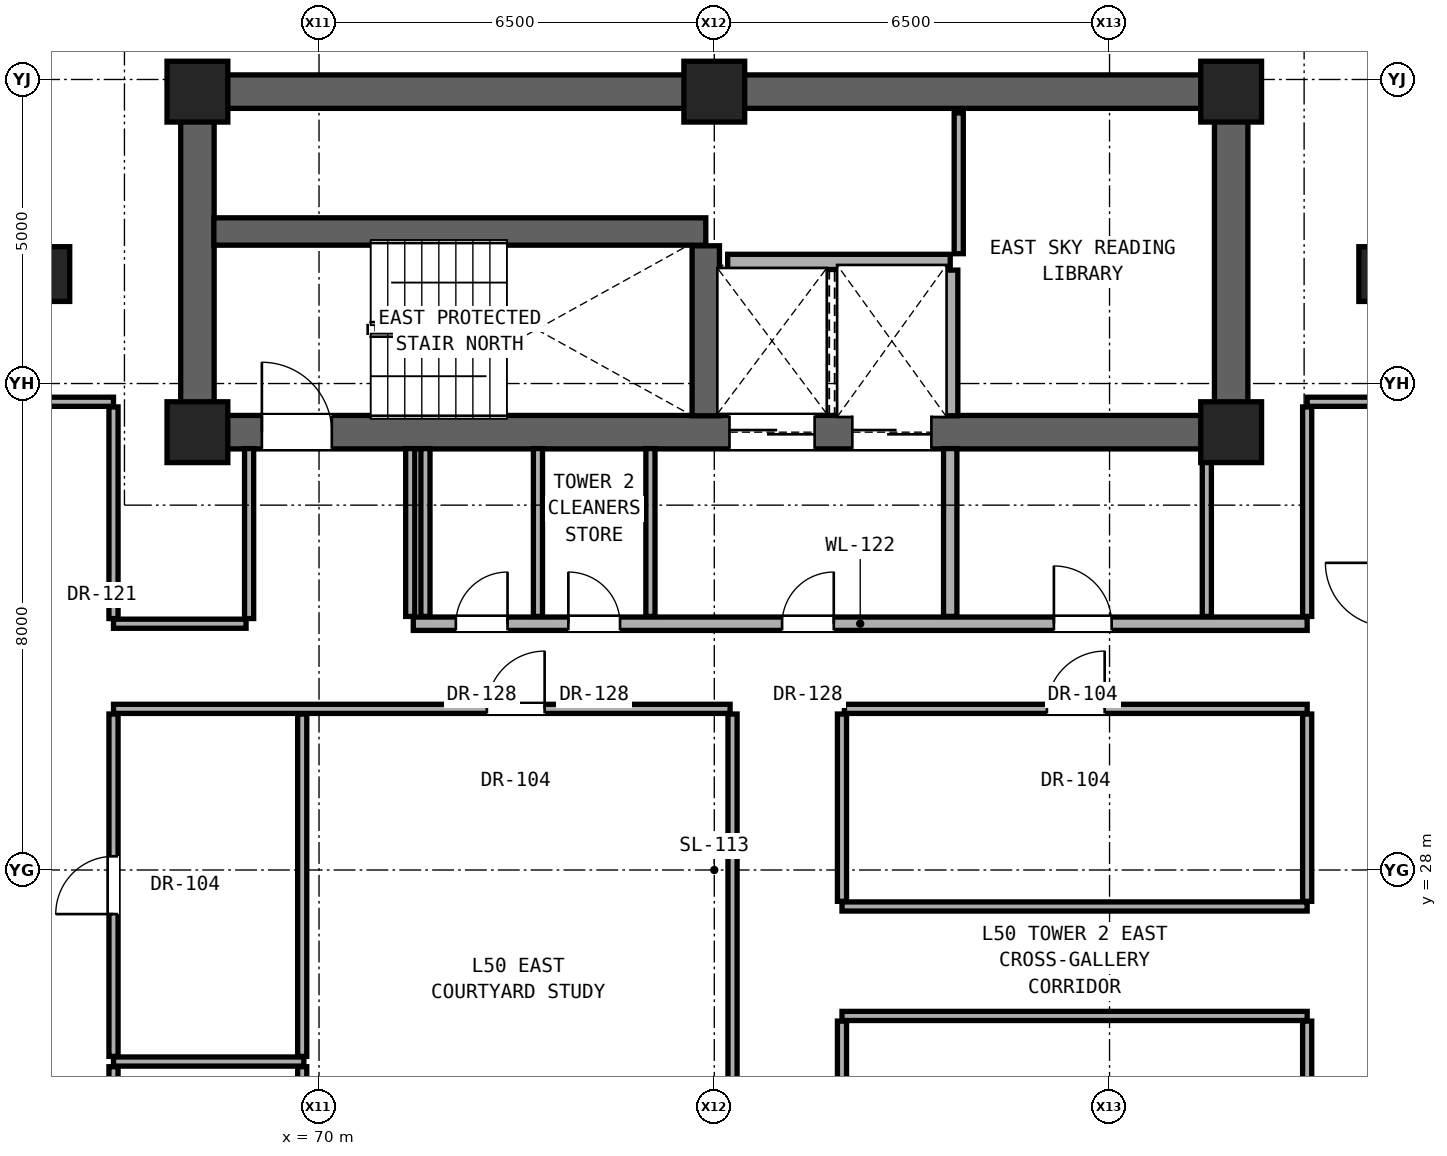
"""IFC4 building model, lengths in metres.
Left out: names, types, materials, properties, quantities, classifications, styles, units other than length and angle.
Written with IfcOpenShell. Run it as: python <this file> out.ifc"""

import sys

from ifc_helpers import new_model, si_unit, direction, frame, frame_2d, origin, origin_2d, place, context, subcontext, project, spatial, rectangle, extrude, element, fill, save


model = new_model("IFC4")
c1 = context("Model", 3, precision=1e-05, world=origin(), true_north=direction((0.0, 1.0)))
c2 = subcontext(c1, "Body", "Model", "MODEL_VIEW")
j1 = project(units=[si_unit("LENGTHUNIT", "METRE"), si_unit("PLANEANGLEUNIT", "RADIAN")], contexts=[c1])
p1 = place(None, origin())
s1 = spatial("IfcSite", under=j1, at=p1, CompositionType="ELEMENT")
p2 = place(p1, origin())
s2 = spatial("IfcBuilding", under=s1, at=p2, CompositionType="ELEMENT")
p3 = place(p2, frame((0.0, 0.0, 177.15)))
s3 = spatial("IfcBuildingStorey", under=s2, at=p3, CompositionType="ELEMENT", Elevation=177.15)
for number, where, z_axis, x_axis in (
    (1, (68.0, 35.2, 0.0), (0.0, 0.0, 1.0), (1.0, 0.0, 0.0)),
    (2, (85.0, 35.2, 0.0), (0.0, 0.0, 1.0), (1.0, 0.0, 0.0)),
    (3, (68.0, 40.8, 0.0), (0.0, 0.0, 1.0), (1.0, 0.0, 0.0)),
    (4, (76.5, 40.8, 0.0), (0.0, 0.0, 1.0), (1.0, 0.0, 0.0)),
    (5, (85.0, 40.8, 0.0), (0.0, 0.0, 1.0), (1.0, 0.0, 0.0)),
):
    element("IfcColumn", number, at=place(p3, frame(where, z_axis=z_axis, x_axis=x_axis)), inside=s3, PredefinedType="COLUMN", context=c2, shape_type="SweptSolid", body=[
        extrude(rectangle(XDim=1.0, YDim=1.0, at=origin_2d()), origin(), (0.0, 0.0, 1.0), 3.25),
    ])
for number, where, z_axis, x_axis in (
    (6, (65.6, 37.8, 0.0), (0.0, 0.0, 1.0), (1.0, 0.0, 0.0)),
    (7, (87.4, 37.8, 0.0), (0.0, 0.0, 1.0), (1.0, 0.0, 0.0)),
):
    element("IfcColumn", number, at=place(p3, frame(where, z_axis=z_axis, x_axis=x_axis)), inside=s3, PredefinedType="PILASTER", context=c2, shape_type="SweptSolid", body=[
        extrude(rectangle(XDim=0.6, YDim=0.9, at=origin_2d()), origin(), (0.0, 0.0, 1.0), 3.25),
    ])
p4 = place(p3, frame((68.0, 40.8, 0.0), z_axis=(0.0, 0.0, 1.0), x_axis=(1.0, 0.0, 0.0)))
e8 = element("IfcWall", 8, at=p4, inside=s3, PredefinedType="SHEAR", context=c2, shape_type="SweptSolid", body=[
    extrude(rectangle(XDim=17.0, YDim=0.55, at=frame_2d((8.5, 0.0))), origin(), (0.0, 0.0, 1.0), 3.05),
])
for number, where, z_axis, x_axis in (
    (9, (68.0, 35.2, 0.0), (0.0, 0.0, 1.0), (0.0, 1.0, 0.0)),
    (10, (85.0, 35.2, 0.0), (0.0, 0.0, 1.0), (0.0, 1.0, 0.0)),
):
    element("IfcWall", number, at=place(p3, frame(where, z_axis=z_axis, x_axis=x_axis)), inside=s3, PredefinedType="SHEAR", context=c2, shape_type="SweptSolid", body=[
        extrude(rectangle(XDim=5.6, YDim=0.55, at=frame_2d((2.8, 0.0))), origin(), (0.0, 0.0, 1.0), 3.05),
    ])
p5 = place(p3, frame((68.0, 35.2, 0.0), z_axis=(0.0, 0.0, 1.0), x_axis=(1.0, 0.0, 0.0)))
e11 = element("IfcWall", 11, at=p5, inside=s3, PredefinedType="SHEAR", context=c2, shape_type="SweptSolid", body=[
    extrude(rectangle(XDim=17.0, YDim=0.55, at=frame_2d((8.5, 0.0))), origin(), (0.0, 0.0, 1.0), 3.05),
])
p6 = place(p5, frame((1.06, 0.0, 0.0)))
e12 = element("IfcOpeningElement", 12, at=p6, cuts=e11, PredefinedType="OPENING", context=c2, shape_type="SweptSolid", body=[
    extrude(rectangle(XDim=1.15, YDim=2.2, at=frame_2d((0.575, 1.1))), frame((0.0, 0.285, 0.0), z_axis=(0.0, -1.0, 0.0), x_axis=(1.0, 0.0, 0.0)), (0.0, 0.0, 1.0), 0.57),
])
p7 = place(p5, frame((8.75, 0.0, 0.0)))
e13 = element("IfcOpeningElement", 13, at=p7, cuts=e11, PredefinedType="OPENING", context=c2, shape_type="SweptSolid", body=[
    extrude(rectangle(XDim=1.4, YDim=2.35, at=frame_2d((0.7, 1.175))), frame((0.0, 0.285, 0.0), z_axis=(0.0, -1.0, 0.0), x_axis=(1.0, 0.0, 0.0)), (0.0, 0.0, 1.0), 0.57),
])
p8 = place(p5, frame((10.77, 0.0, 0.0)))
e14 = element("IfcOpeningElement", 14, at=p8, cuts=e11, PredefinedType="OPENING", context=c2, shape_type="SweptSolid", body=[
    extrude(rectangle(XDim=1.3, YDim=2.3, at=frame_2d((0.65, 1.15))), frame((0.0, 0.285, 0.0), z_axis=(0.0, -1.0, 0.0), x_axis=(1.0, 0.0, 0.0)), (0.0, 0.0, 1.0), 0.57),
])
p9 = place(p3, frame((66.62, 24.85, 0.0), z_axis=(0.0, 0.0, 1.0), x_axis=(1.0, 0.0, 0.0)))
e15 = element("IfcWall", 15, at=p9, inside=s3, PredefinedType="PARTITIONING", context=c2, shape_type="SweptSolid", body=[
    extrude(rectangle(XDim=3.13, YDim=0.15, at=frame_2d((1.565, 0.0))), origin(), (0.0, 0.0, 1.0), 2.186),
])
for number, where, z_axis, x_axis in (
    (16, (78.6, 25.6, 0.0), (0.0, 0.0, 1.0), (1.0, 0.0, 0.0)),
    (17, (78.6, 27.4, 0.0), (0.0, 0.0, 1.0), (1.0, 0.0, 0.0)),
):
    element("IfcWall", number, at=place(p3, frame(where, z_axis=z_axis, x_axis=x_axis)), inside=s3, PredefinedType="PARTITIONING", context=c2, shape_type="SweptSolid", body=[
        extrude(rectangle(XDim=7.65, YDim=0.15, at=frame_2d((3.825, 0.0))), origin(), (0.0, 0.0, 1.0), 2.186),
    ])
p10 = place(p3, frame((66.62, 30.65, 0.0), z_axis=(0.0, 0.0, 1.0), x_axis=(1.0, 0.0, 0.0)))
e18 = element("IfcWall", 18, at=p10, inside=s3, PredefinedType="PARTITIONING", context=c2, shape_type="SweptSolid", body=[
    extrude(rectangle(XDim=10.14, YDim=0.15, at=frame_2d((5.07, 0.0))), origin(), (0.0, 0.0, 1.0), 2.186),
])
p11 = place(p10, frame((6.14, 0.0, 0.0)))
e19 = element("IfcOpeningElement", 19, at=p11, cuts=e18, PredefinedType="OPENING", context=c2, shape_type="SweptSolid", body=[
    extrude(rectangle(XDim=0.95, YDim=2.15, at=frame_2d((0.475, 1.075))), frame((0.0, 0.085, 0.0), z_axis=(0.0, -1.0, 0.0), x_axis=(1.0, 0.0, 0.0)), (0.0, 0.0, 1.0), 0.17),
])
p12 = place(p3, frame((78.64, 30.65, 0.0), z_axis=(0.0, 0.0, 1.0), x_axis=(1.0, 0.0, 0.0)))
e20 = element("IfcWall", 20, at=p12, inside=s3, PredefinedType="PARTITIONING", context=c2, shape_type="SweptSolid", body=[
    extrude(rectangle(XDim=7.61, YDim=0.15, at=frame_2d((3.805, 0.0))), origin(), (0.0, 0.0, 1.0), 2.186),
])
p13 = place(p12, frame((3.33, 0.0, 0.0)))
e21 = element("IfcOpeningElement", 21, at=p13, cuts=e20, PredefinedType="OPENING", context=c2, shape_type="SweptSolid", body=[
    extrude(rectangle(XDim=0.95, YDim=2.15, at=frame_2d((0.475, 1.075))), frame((0.0, 0.085, 0.0), z_axis=(0.0, -1.0, 0.0), x_axis=(1.0, 0.0, 0.0)), (0.0, 0.0, 1.0), 0.17),
])
p14 = place(p3, frame((66.62, 32.05, 0.0), z_axis=(0.0, 0.0, 1.0), x_axis=(1.0, 0.0, 0.0)))
e22 = element("IfcWall", 22, at=p14, inside=s3, PredefinedType="PARTITIONING", context=c2, shape_type="SweptSolid", body=[
    extrude(rectangle(XDim=2.18, YDim=0.15, at=frame_2d((1.09, 0.0))), origin(), (0.0, 0.0, 1.0), 2.186),
])
p15 = place(p3, frame((71.55, 32.05, 0.0), z_axis=(0.0, 0.0, 1.0), x_axis=(1.0, 0.0, 0.0)))
e23 = element("IfcWall", 23, at=p15, inside=s3, PredefinedType="SOLIDWALL", context=c2, shape_type="SweptSolid", body=[
    extrude(rectangle(XDim=14.7, YDim=0.22, at=frame_2d((7.35, 0.0))), origin(), (0.0, 0.0, 1.0), 2.186),
])
p16 = place(p15, frame((6.065, 0.0, 0.0)))
e24 = element("IfcOpeningElement", 24, at=p16, cuts=e23, PredefinedType="OPENING", context=c2, shape_type="SweptSolid", body=[
    extrude(rectangle(XDim=0.85, YDim=2.01, at=frame_2d((0.425, 1.005))), frame((0.0, 0.12, 0.0), z_axis=(0.0, -1.0, 0.0), x_axis=(1.0, 0.0, 0.0)), (0.0, 0.0, 1.0), 0.24),
])
p17 = place(p15, frame((10.535, 0.0, 0.0)))
e25 = element("IfcOpeningElement", 25, at=p17, cuts=e23, PredefinedType="OPENING", context=c2, shape_type="SweptSolid", body=[
    extrude(rectangle(XDim=0.95, YDim=2.15, at=frame_2d((0.475, 1.075))), frame((0.0, 0.12, 0.0), z_axis=(0.0, -1.0, 0.0), x_axis=(1.0, 0.0, 0.0)), (0.0, 0.0, 1.0), 0.24),
])
p18 = place(p15, frame((0.7, 0.0, 0.0)))
e26 = element("IfcOpeningElement", 26, at=p18, cuts=e23, PredefinedType="OPENING", context=c2, shape_type="SweptSolid", body=[
    extrude(rectangle(XDim=0.85, YDim=2.01, at=frame_2d((0.425, 1.005))), frame((0.0, 0.12, 0.0), z_axis=(0.0, -1.0, 0.0), x_axis=(1.0, 0.0, 0.0)), (0.0, 0.0, 1.0), 0.24),
])
p19 = place(p15, frame((2.55, 0.0, 0.0)))
e27 = element("IfcOpeningElement", 27, at=p19, cuts=e23, PredefinedType="OPENING", context=c2, shape_type="SweptSolid", body=[
    extrude(rectangle(XDim=0.85, YDim=2.01, at=frame_2d((0.425, 1.005))), frame((0.0, 0.12, 0.0), z_axis=(0.0, -1.0, 0.0), x_axis=(1.0, 0.0, 0.0)), (0.0, 0.0, 1.0), 0.24),
])
p20 = place(p3, frame((65.25, 35.7, 0.0), z_axis=(0.0, 0.0, 1.0), x_axis=(1.0, 0.0, 0.0)))
e28 = element("IfcWall", 28, at=p20, inside=s3, PredefinedType="PARTITIONING", context=c2, shape_type="SweptSolid", body=[
    extrude(rectangle(XDim=1.37, YDim=0.15, at=frame_2d((0.685, 0.0))), origin(), (0.0, 0.0, 1.0), 3.05),
])
p21 = place(p3, frame((86.25, 35.7, 0.0), z_axis=(0.0, 0.0, 1.0), x_axis=(1.0, 0.0, 0.0)))
e29 = element("IfcWall", 29, at=p21, inside=s3, PredefinedType="PARTITIONING", context=c2, shape_type="SweptSolid", body=[
    extrude(rectangle(XDim=1.35, YDim=0.15, at=frame_2d((0.675, 0.0))), origin(), (0.0, 0.0, 1.0), 3.05),
])
p22 = place(p3, frame((76.72, 38.0, 0.0), z_axis=(0.0, 0.0, 1.0), x_axis=(1.0, 0.0, 0.0)))
e30 = element("IfcWall", 30, at=p22, inside=s3, PredefinedType="SOLIDWALL", context=c2, shape_type="SweptSolid", body=[
    extrude(rectangle(XDim=3.66, YDim=0.25, at=frame_2d((1.83, 0.0))), origin(), (0.0, 0.0, 1.0), 3.05),
])
p23 = place(p3, frame((68.27, 38.5, 0.0), z_axis=(0.0, 0.0, 1.0), x_axis=(1.0, 0.0, 0.0)))
e31 = element("IfcWall", 31, at=p23, inside=s3, PredefinedType="SHEAR", context=c2, shape_type="SweptSolid", body=[
    extrude(rectangle(XDim=8.09, YDim=0.45, at=frame_2d((4.045, 0.0))), origin(), (0.0, 0.0, 1.0), 3.05),
])
p24 = place(p3, frame((66.62, 22.435, 0.0), z_axis=(0.0, 0.0, 1.0), x_axis=(0.0, 1.0, 0.0)))
e32 = element("IfcWall", 32, at=p24, inside=s3, PredefinedType="PARTITIONING", context=c2, shape_type="SweptSolid", body=[
    extrude(rectangle(XDim=2.33, YDim=0.15, at=frame_2d((1.165, 0.0))), origin(), (0.0, 0.0, 1.0), 3.05),
])
p25 = place(p24, frame((0.715, 0.0, 0.0)))
e33 = element("IfcOpeningElement", 33, at=p25, cuts=e32, PredefinedType="OPENING", context=c2, shape_type="SweptSolid", body=[
    extrude(rectangle(XDim=0.9, YDim=2.1, at=frame_2d((0.45, 1.05))), frame((0.0, 0.085, 0.0), z_axis=(0.0, -1.0, 0.0), x_axis=(1.0, 0.0, 0.0)), (0.0, 0.0, 1.0), 0.17),
])
p26 = place(p3, frame((66.62, 24.935, 0.0), z_axis=(0.0, 0.0, 1.0), x_axis=(0.0, 1.0, 0.0)))
e34 = element("IfcWall", 34, at=p26, inside=s3, PredefinedType="PARTITIONING", context=c2, shape_type="SweptSolid", body=[
    extrude(rectangle(XDim=5.63, YDim=0.15, at=frame_2d((2.815, 0.0))), origin(), (0.0, 0.0, 1.0), 2.346),
])
p27 = place(p26, frame((2.34, 0.0, 0.0)))
e35 = element("IfcOpeningElement", 35, at=p27, cuts=e34, PredefinedType="OPENING", context=c2, shape_type="SweptSolid", body=[
    extrude(rectangle(XDim=0.95, YDim=2.15, at=frame_2d((0.475, 1.075))), frame((0.0, 0.085, 0.0), z_axis=(0.0, -1.0, 0.0), x_axis=(1.0, 0.0, 0.0)), (0.0, 0.0, 1.0), 0.17),
])
p28 = place(p3, frame((66.62, 32.135, 0.0), z_axis=(0.0, 0.0, 1.0), x_axis=(0.0, 1.0, 0.0)))
e36 = element("IfcWall", 36, at=p28, inside=s3, PredefinedType="PARTITIONING", context=c2, shape_type="SweptSolid", body=[
    extrude(rectangle(XDim=3.48, YDim=0.15, at=frame_2d((1.74, 0.0))), origin(), (0.0, 0.0, 1.0), 2.442),
])
p29 = place(p3, frame((68.85, 32.135, 0.0), z_axis=(0.0, 0.0, 1.0), x_axis=(0.0, 1.0, 0.0)))
e37 = element("IfcWall", 37, at=p29, inside=s3, PredefinedType="PARTITIONING", context=c2, shape_type="SweptSolid", body=[
    extrude(rectangle(XDim=2.795, YDim=0.15, at=frame_2d((1.397, 0.0))), origin(), (0.0, 0.0, 1.0), 3.05),
])
p30 = place(p3, frame((69.723, 22.435, 0.0), z_axis=(0.0, 0.0, 1.0), x_axis=(0.0, 1.0, 0.0)))
e38 = element("IfcWall", 38, at=p30, inside=s3, PredefinedType="PARTITIONING", context=c2, shape_type="SweptSolid", body=[
    extrude(rectangle(XDim=2.33, YDim=0.15, at=frame_2d((1.165, 0.0))), origin(), (0.0, 0.0, 1.0), 3.05),
])
p31 = place(p3, frame((69.723, 24.935, 0.0), z_axis=(0.0, 0.0, 1.0), x_axis=(0.0, 1.0, 0.0)))
e39 = element("IfcWall", 39, at=p31, inside=s3, PredefinedType="PARTITIONING", context=c2, shape_type="SweptSolid", body=[
    extrude(rectangle(XDim=5.63, YDim=0.15, at=frame_2d((2.815, 0.0))), origin(), (0.0, 0.0, 1.0), 2.186),
])
for number, where, z_axis, x_axis in (
    (40, (71.5, 32.17, 0.0), (0.0, 0.0, 1.0), (0.0, 1.0, 0.0)),
    (41, (71.75, 32.17, 0.0), (0.0, 0.0, 1.0), (0.0, 1.0, 0.0)),
    (42, (73.6, 32.17, 0.0), (0.0, 0.0, 1.0), (0.0, 1.0, 0.0)),
    (43, (75.45, 32.17, 0.0), (0.0, 0.0, 1.0), (0.0, 1.0, 0.0)),
):
    element("IfcWall", number, at=place(p3, frame(where, z_axis=z_axis, x_axis=x_axis)), inside=s3, PredefinedType="PARTITIONING", context=c2, shape_type="SweptSolid", body=[
        extrude(rectangle(XDim=2.76, YDim=0.15, at=frame_2d((1.38, 0.0))), origin(), (0.0, 0.0, 1.0), 3.05),
    ])
p32 = place(p3, frame((76.36, 35.47, 0.0), z_axis=(0.0, 0.0, 1.0), x_axis=(0.0, 1.0, 0.0)))
e44 = element("IfcWall", 44, at=p32, inside=s3, PredefinedType="SHEAR", context=c2, shape_type="SweptSolid", body=[
    extrude(rectangle(XDim=2.795, YDim=0.45, at=frame_2d((1.397, 0.0))), origin(), (0.0, 0.0, 1.0), 3.05),
])
p33 = place(p3, frame((76.8, 22.435, 0.0), z_axis=(0.0, 0.0, 1.0), x_axis=(0.0, 1.0, 0.0)))
e45 = element("IfcWall", 45, at=p33, inside=s3, PredefinedType="PARTITIONING", context=c2, shape_type="SweptSolid", body=[
    extrude(rectangle(XDim=8.13, YDim=0.15, at=frame_2d((4.065, 0.0))), origin(), (0.0, 0.0, 1.0), 2.186),
])
p34 = place(p3, frame((78.6, 22.435, 0.0), z_axis=(0.0, 0.0, 1.0), x_axis=(0.0, 1.0, 0.0)))
e46 = element("IfcWall", 46, at=p34, inside=s3, PredefinedType="PARTITIONING", context=c2, shape_type="SweptSolid", body=[
    extrude(rectangle(XDim=3.08, YDim=0.15, at=frame_2d((1.54, 0.0))), origin(), (0.0, 0.0, 1.0), 3.05),
])
p35 = place(p3, frame((78.6, 27.485, 0.0), z_axis=(0.0, 0.0, 1.0), x_axis=(0.0, 1.0, 0.0)))
e47 = element("IfcWall", 47, at=p35, inside=s3, PredefinedType="PARTITIONING", context=c2, shape_type="SweptSolid", body=[
    extrude(rectangle(XDim=3.08, YDim=0.15, at=frame_2d((1.54, 0.0))), origin(), (0.0, 0.0, 1.0), 2.186),
])
p36 = place(p3, frame((80.38, 32.17, 0.0), z_axis=(0.0, 0.0, 1.0), x_axis=(0.0, 1.0, 0.0)))
e48 = element("IfcWall", 48, at=p36, inside=s3, PredefinedType="SOLIDWALL", context=c2, shape_type="SweptSolid", body=[
    extrude(rectangle(XDim=2.76, YDim=0.22, at=frame_2d((1.38, 0.0))), origin(), (0.0, 0.0, 1.0), 3.05),
])
p37 = place(p3, frame((80.38, 35.47, 0.0), z_axis=(0.0, 0.0, 1.0), x_axis=(0.0, 1.0, 0.0)))
e49 = element("IfcWall", 49, at=p37, inside=s3, PredefinedType="SOLIDWALL", context=c2, shape_type="SweptSolid", body=[
    extrude(rectangle(XDim=2.395, YDim=0.25, at=frame_2d((1.198, 0.0))), origin(), (0.0, 0.0, 1.0), 3.05),
])
p38 = place(p3, frame((80.52, 38.135, 0.0), z_axis=(0.0, 0.0, 1.0), x_axis=(0.0, 1.0, 0.0)))
e50 = element("IfcWall", 50, at=p38, inside=s3, PredefinedType="PARTITIONING", context=c2, shape_type="SweptSolid", body=[
    extrude(rectangle(XDim=2.315, YDim=0.15, at=frame_2d((1.157, 0.0))), origin(), (0.0, 0.0, 1.0), 3.05),
])
p39 = place(p3, frame((84.6, 32.17, 0.0), z_axis=(0.0, 0.0, 1.0), x_axis=(0.0, 1.0, 0.0)))
e51 = element("IfcWall", 51, at=p39, inside=s3, PredefinedType="PARTITIONING", context=c2, shape_type="SweptSolid", body=[
    extrude(rectangle(XDim=2.76, YDim=0.15, at=frame_2d((1.38, 0.0))), origin(), (0.0, 0.0, 1.0), 3.05),
])
p40 = place(p3, frame((86.25, 22.435, 0.0), z_axis=(0.0, 0.0, 1.0), x_axis=(0.0, 1.0, 0.0)))
e52 = element("IfcWall", 52, at=p40, inside=s3, PredefinedType="PARTITIONING", context=c2, shape_type="SweptSolid", body=[
    extrude(rectangle(XDim=3.08, YDim=0.15, at=frame_2d((1.54, 0.0))), origin(), (0.0, 0.0, 1.0), 3.05),
])
p41 = place(p3, frame((86.25, 27.485, 0.0), z_axis=(0.0, 0.0, 1.0), x_axis=(0.0, 1.0, 0.0)))
e53 = element("IfcWall", 53, at=p41, inside=s3, PredefinedType="PARTITIONING", context=c2, shape_type="SweptSolid", body=[
    extrude(rectangle(XDim=3.08, YDim=0.15, at=frame_2d((1.54, 0.0))), origin(), (0.0, 0.0, 1.0), 2.346),
])
p42 = place(p3, frame((86.25, 32.17, 0.0), z_axis=(0.0, 0.0, 1.0), x_axis=(0.0, 1.0, 0.0)))
e54 = element("IfcWall", 54, at=p42, inside=s3, PredefinedType="PARTITIONING", context=c2, shape_type="SweptSolid", body=[
    extrude(rectangle(XDim=3.445, YDim=0.15, at=frame_2d((1.723, 0.0))), origin(), (0.0, 0.0, 1.0), 2.442),
])
p43 = place(p6, origin())
e55 = element("IfcDoor", 55, at=p43, inside=s3, OperationType="SINGLE_SWING_LEFT", PredefinedType="DOOR", context=c2, shape_type="SweptSolid", body=[
    extrude(rectangle(XDim=1.15, YDim=2.2, at=frame_2d((0.575, 1.1))), frame((0.0, 0.025, 0.0), z_axis=(0.0, -1.0, 0.0), x_axis=(1.0, 0.0, 0.0)), (0.0, 0.0, 1.0), 0.05),
])
fill(e12, e55)
p44 = place(p16, origin())
e56 = element("IfcDoor", 56, at=p44, inside=s3, OperationType="SINGLE_SWING_RIGHT", PredefinedType="DOOR", context=c2, shape_type="SweptSolid", body=[
    extrude(rectangle(XDim=0.85, YDim=2.01, at=frame_2d((0.425, 1.005))), frame((0.0, 0.025, 0.0), z_axis=(0.0, -1.0, 0.0), x_axis=(1.0, 0.0, 0.0)), (0.0, 0.0, 1.0), 0.05),
])
fill(e24, e56)
p45 = place(p17, origin())
e57 = element("IfcDoor", 57, at=p45, inside=s3, OperationType="SINGLE_SWING_LEFT", PredefinedType="DOOR", context=c2, shape_type="SweptSolid", body=[
    extrude(rectangle(XDim=0.95, YDim=2.15, at=frame_2d((0.475, 1.075))), frame((0.0, 0.025, 0.0), z_axis=(0.0, -1.0, 0.0), x_axis=(1.0, 0.0, 0.0)), (0.0, 0.0, 1.0), 0.05),
])
fill(e25, e57)
p46 = place(p18, origin())
e58 = element("IfcDoor", 58, at=p46, inside=s3, OperationType="SINGLE_SWING_RIGHT", PredefinedType="DOOR", context=c2, shape_type="SweptSolid", body=[
    extrude(rectangle(XDim=0.85, YDim=2.01, at=frame_2d((0.425, 1.005))), frame((0.0, 0.025, 0.0), z_axis=(0.0, -1.0, 0.0), x_axis=(1.0, 0.0, 0.0)), (0.0, 0.0, 1.0), 0.05),
])
fill(e26, e58)
p47 = place(p19, origin())
e59 = element("IfcDoor", 59, at=p47, inside=s3, OperationType="SINGLE_SWING_LEFT", PredefinedType="DOOR", context=c2, shape_type="SweptSolid", body=[
    extrude(rectangle(XDim=0.85, YDim=2.01, at=frame_2d((0.425, 1.005))), frame((0.0, 0.025, 0.0), z_axis=(0.0, -1.0, 0.0), x_axis=(1.0, 0.0, 0.0)), (0.0, 0.0, 1.0), 0.05),
])
fill(e27, e59)
p48 = place(p27, origin())
e60 = element("IfcDoor", 60, at=p48, inside=s3, OperationType="SINGLE_SWING_LEFT", PredefinedType="DOOR", context=c2, shape_type="SweptSolid", body=[
    extrude(rectangle(XDim=0.95, YDim=2.15, at=frame_2d((0.475, 1.075))), frame((0.0, 0.025, 0.0), z_axis=(0.0, -1.0, 0.0), x_axis=(1.0, 0.0, 0.0)), (0.0, 0.0, 1.0), 0.05),
])
fill(e35, e60)
p49 = place(p11, origin())
e61 = element("IfcDoor", 61, at=p49, inside=s3, OperationType="SINGLE_SWING_RIGHT", PredefinedType="DOOR", context=c2, shape_type="SweptSolid", body=[
    extrude(rectangle(XDim=0.95, YDim=2.15, at=frame_2d((0.475, 1.075))), frame((0.0, 0.025, 0.0), z_axis=(0.0, -1.0, 0.0), x_axis=(1.0, 0.0, 0.0)), (0.0, 0.0, 1.0), 0.05),
])
fill(e19, e61)
p50 = place(p13, origin())
e62 = element("IfcDoor", 62, at=p50, inside=s3, OperationType="SINGLE_SWING_RIGHT", PredefinedType="DOOR", context=c2, shape_type="SweptSolid", body=[
    extrude(rectangle(XDim=0.95, YDim=2.15, at=frame_2d((0.475, 1.075))), frame((0.0, 0.025, 0.0), z_axis=(0.0, -1.0, 0.0), x_axis=(1.0, 0.0, 0.0)), (0.0, 0.0, 1.0), 0.05),
])
fill(e21, e62)
p51 = place(p7, origin())
e63 = element("IfcDoor", 63, at=p51, inside=s3, OperationType="DOUBLE_DOOR_SLIDING", PredefinedType="DOOR", context=c2, shape_type="SweptSolid", body=[
    extrude(rectangle(XDim=1.4, YDim=2.35, at=frame_2d((0.7, 1.175))), frame((0.0, 0.025, 0.0), z_axis=(0.0, -1.0, 0.0), x_axis=(1.0, 0.0, 0.0)), (0.0, 0.0, 1.0), 0.05),
])
fill(e13, e63)
p52 = place(p8, origin())
e64 = element("IfcDoor", 64, at=p52, inside=s3, OperationType="DOUBLE_DOOR_SLIDING", PredefinedType="DOOR", context=c2, shape_type="SweptSolid", body=[
    extrude(rectangle(XDim=1.3, YDim=2.3, at=frame_2d((0.65, 1.15))), frame((0.0, 0.025, 0.0), z_axis=(0.0, -1.0, 0.0), x_axis=(1.0, 0.0, 0.0)), (0.0, 0.0, 1.0), 0.05),
])
fill(e14, e64)
save(model, sys.argv[1])
